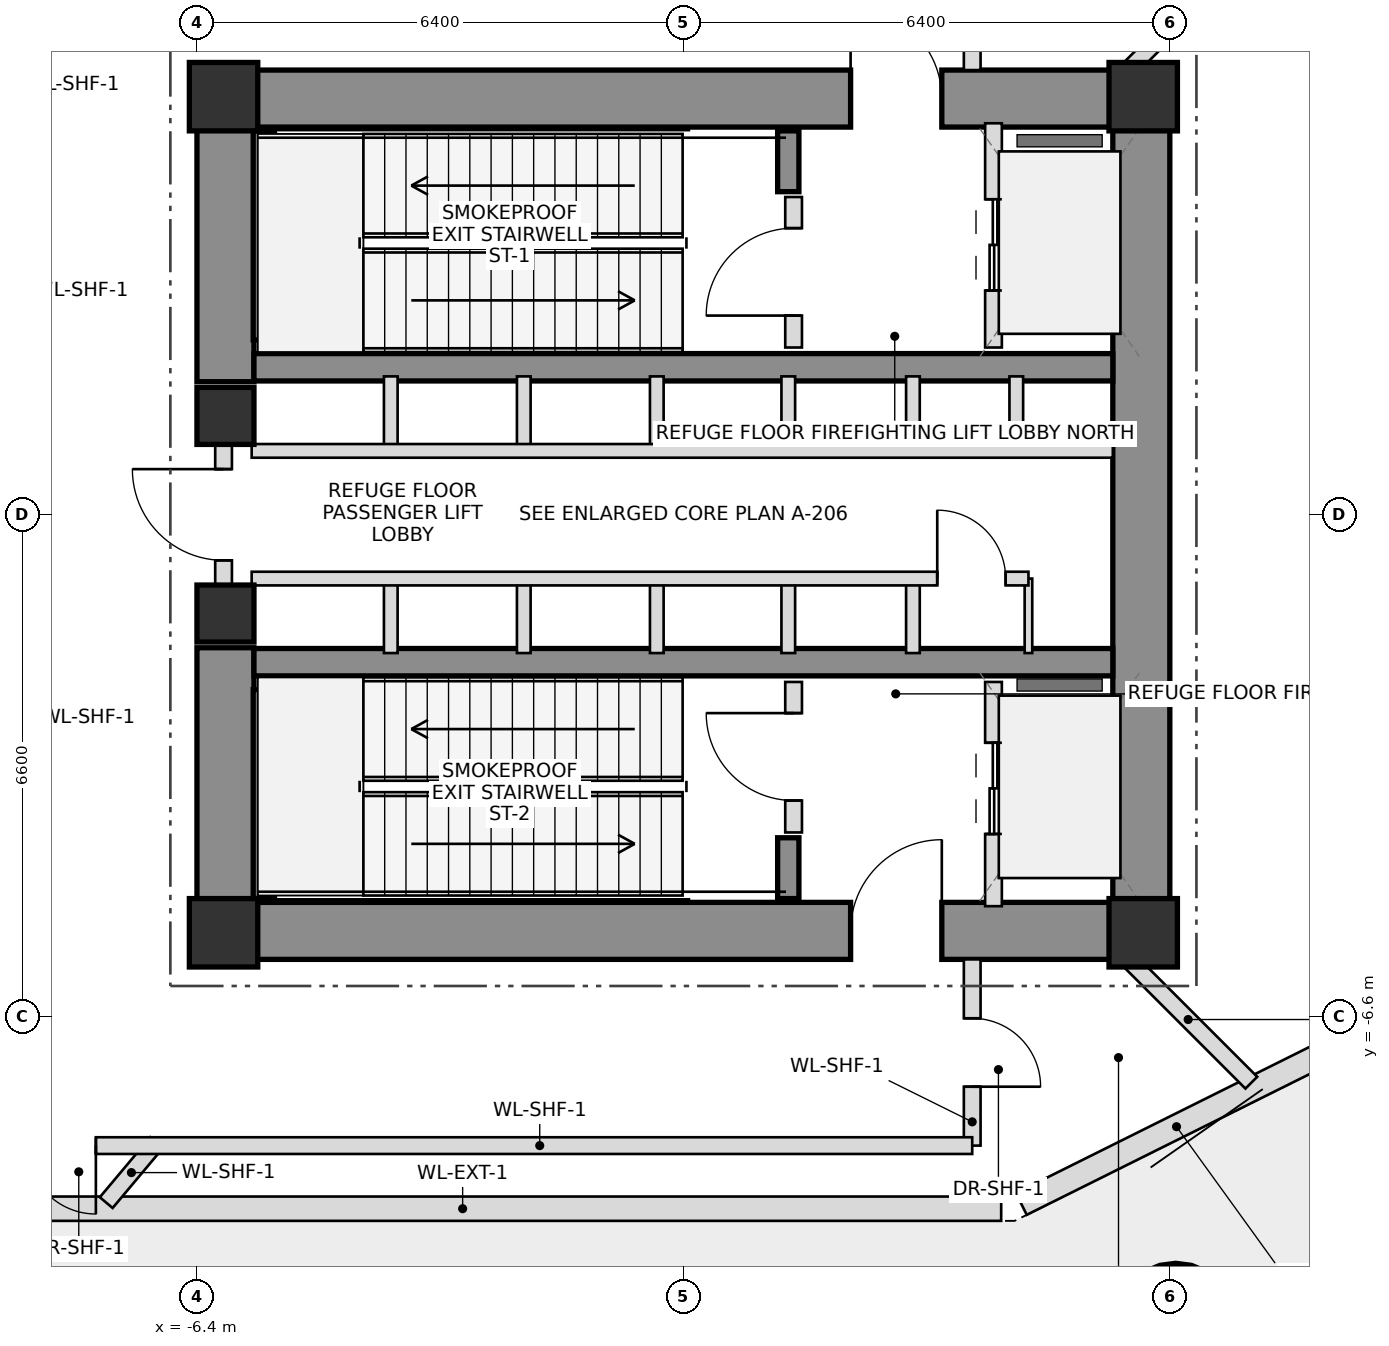
"""IFC4 building model, lengths in metres.
Left out: names, types, materials, properties, quantities, classifications, styles, units other than length and angle.
Written with IfcOpenShell. Run it as: python <this file> out.ifc"""

import sys

from ifc_helpers import new_model, si_unit, direction, frame, frame_2d, origin, origin_2d, place, context, subcontext, project, spatial, rectangle, hollow_circle, extrude, source, transform, mapped, element, fill, save


model = new_model("IFC4")
c1 = context("Model", 3, precision=1e-05, world=origin(), true_north=direction((0.0, 1.0)))
c2 = subcontext(c1, "Body", "Model", "MODEL_VIEW")
j1 = project(units=[si_unit("LENGTHUNIT", "METRE"), si_unit("PLANEANGLEUNIT", "RADIAN")], contexts=[c1])
p1 = place(None, origin())
s1 = spatial("IfcSite", under=j1, at=p1, CompositionType="ELEMENT")
p2 = place(p1, origin())
s2 = spatial("IfcBuilding", under=s1, at=p2, CompositionType="ELEMENT")
p3 = place(p2, frame((0.0, 0.0, 49.7)))
s3 = spatial("IfcBuildingStorey", under=s2, at=p3, CompositionType="ELEMENT", Elevation=49.7)
m1 = source(origin(), c2, "Body", "SweptSolid", [
    extrude(rectangle(XDim=0.9, YDim=0.9, at=origin_2d()), origin(), (0.0, 0.0, 1.0), 5.1),
])
for number, where, z_axis, x_axis in (
    (1, (-6.05, -5.5, 0.0), (0.0, 0.0, 1.0), (1.0, 0.0, 0.0)),
    (2, (6.05, -5.5, 0.0), (0.0, 0.0, 1.0), (1.0, 0.0, 0.0)),
    (3, (6.05, 5.5, 0.0), (0.0, 0.0, 1.0), (1.0, 0.0, 0.0)),
    (4, (-6.05, 5.5, 0.0), (0.0, 0.0, 1.0), (1.0, 0.0, 0.0)),
):
    element("IfcColumn", number, at=place(p3, frame(where, z_axis=z_axis, x_axis=x_axis)), inside=s3, PredefinedType="COLUMN", context=c2, shape_type="MappedRepresentation", body=[
        mapped(m1, transform((0.0, 0.0, 0.0), scale=1.0)),
    ])
p4 = place(p3, frame((-6.4, 5.475, 0.0), z_axis=(0.0, 0.0, 1.0), x_axis=(1.0, 0.0, 0.0)))
e5 = element("IfcWall", 5, at=p4, inside=s3, PredefinedType="SHEAR", context=c2, shape_type="SweptSolid", body=[
    extrude(rectangle(XDim=12.8, YDim=0.75, at=frame_2d((6.4, 0.0))), origin(), (0.0, 0.0, 1.0), 5.1),
])
p5 = place(p4, frame((8.6, 0.0, 0.0)))
e6 = element("IfcOpeningElement", 6, at=p5, cuts=e5, PredefinedType="OPENING", context=c2, shape_type="SweptSolid", body=[
    extrude(rectangle(XDim=1.2, YDim=2.2, at=frame_2d((0.6, 1.1))), frame((0.0, 0.385, 0.0), z_axis=(0.0, -1.0, 0.0), x_axis=(1.0, 0.0, 0.0)), (0.0, 0.0, 1.0), 0.77),
])
p6 = place(p3, frame((-6.4, -5.475, 0.0), z_axis=(0.0, 0.0, 1.0), x_axis=(1.0, 0.0, 0.0)))
e7 = element("IfcWall", 7, at=p6, inside=s3, PredefinedType="SHEAR", context=c2, shape_type="SweptSolid", body=[
    extrude(rectangle(XDim=12.8, YDim=0.75, at=frame_2d((6.4, 0.0))), origin(), (0.0, 0.0, 1.0), 5.1),
])
p7 = place(p6, frame((8.6, 0.0, 0.0)))
e8 = element("IfcOpeningElement", 8, at=p7, cuts=e7, PredefinedType="OPENING", context=c2, shape_type="SweptSolid", body=[
    extrude(rectangle(XDim=1.2, YDim=2.2, at=frame_2d((0.6, 1.1))), frame((0.0, 0.385, 0.0), z_axis=(0.0, -1.0, 0.0), x_axis=(1.0, 0.0, 0.0)), (0.0, 0.0, 1.0), 0.77),
])
p8 = place(p3, frame((6.025, -5.1, 0.0), z_axis=(0.0, 0.0, 1.0), x_axis=(0.0, 1.0, 0.0)))
e9 = element("IfcWall", 9, at=p8, inside=s3, PredefinedType="SHEAR", context=c2, shape_type="SweptSolid", body=[
    extrude(rectangle(XDim=10.2, YDim=0.75, at=frame_2d((5.1, 0.0))), origin(), (0.0, 0.0, 1.0), 5.1),
])
for number, where, z_axis, x_axis in (
    (10, (-6.025, -5.1, 0.0), (0.0, 0.0, 1.0), (0.0, 1.0, 0.0)),
    (11, (-6.025, 1.75, 0.0), (0.0, 0.0, 1.0), (0.0, 1.0, 0.0)),
):
    element("IfcWall", number, at=place(p3, frame(where, z_axis=z_axis, x_axis=x_axis)), inside=s3, PredefinedType="SHEAR", context=c2, shape_type="SweptSolid", body=[
        extrude(rectangle(XDim=3.35, YDim=0.75, at=frame_2d((1.675, 0.0))), origin(), (0.0, 0.0, 1.0), 5.1),
    ])
for number, where, z_axis, x_axis in (
    (12, (-5.65, 1.94, 0.0), (0.0, 0.0, 1.0), (1.0, 0.0, 0.0)),
    (13, (-5.65, -1.94, 0.0), (0.0, 0.0, 1.0), (1.0, 0.0, 0.0)),
):
    element("IfcWall", number, at=place(p3, frame(where, z_axis=z_axis, x_axis=x_axis)), inside=s3, PredefinedType="SHEAR", context=c2, shape_type="SweptSolid", body=[
        extrude(rectangle(XDim=11.3, YDim=0.36, at=frame_2d((5.65, 0.0))), origin(), (0.0, 0.0, 1.0), 5.1),
    ])
p9 = place(p3, frame((-5.52, 2.3, 0.0), z_axis=(0.0, 0.0, 1.0), x_axis=(0.0, 1.0, 0.0)))
e14 = element("IfcWall", 14, at=p9, inside=s3, PredefinedType="SHEAR", context=c2, shape_type="SweptSolid", body=[
    extrude(rectangle(XDim=2.75, YDim=0.28, at=frame_2d((1.375, 0.0))), origin(), (0.0, 0.0, 1.0), 5.1),
])
p10 = place(p3, frame((1.38, 4.25, 0.0), z_axis=(0.0, 0.0, 1.0), x_axis=(0.0, 1.0, 0.0)))
e15 = element("IfcWall", 15, at=p10, inside=s3, PredefinedType="SHEAR", context=c2, shape_type="SweptSolid", body=[
    extrude(rectangle(XDim=0.8, YDim=0.28, at=frame_2d((0.4, 0.0))), origin(), (0.0, 0.0, 1.0), 5.1),
])
p11 = place(p3, frame((-5.52, -5.05, 0.0), z_axis=(0.0, 0.0, 1.0), x_axis=(0.0, 1.0, 0.0)))
e16 = element("IfcWall", 16, at=p11, inside=s3, PredefinedType="SHEAR", context=c2, shape_type="SweptSolid", body=[
    extrude(rectangle(XDim=2.75, YDim=0.28, at=frame_2d((1.375, 0.0))), origin(), (0.0, 0.0, 1.0), 5.1),
])
p12 = place(p3, frame((1.38, -5.05, 0.0), z_axis=(0.0, 0.0, 1.0), x_axis=(0.0, 1.0, 0.0)))
e17 = element("IfcWall", 17, at=p12, inside=s3, PredefinedType="SHEAR", context=c2, shape_type="SweptSolid", body=[
    extrude(rectangle(XDim=0.8, YDim=0.28, at=frame_2d((0.4, 0.0))), origin(), (0.0, 0.0, 1.0), 5.1),
])
m2 = source(origin(), c2, "Body", "SweptSolid", [
    extrude(rectangle(XDim=0.75, YDim=0.75, at=origin_2d()), origin(), (0.0, 0.0, 1.0), 5.1),
])
for number, where, z_axis, x_axis in (
    (18, (-6.025, -1.3, 0.0), (0.0, 0.0, 1.0), (1.0, 0.0, 0.0)),
    (19, (-6.025, 1.3, 0.0), (0.0, 0.0, 1.0), (1.0, 0.0, 0.0)),
):
    element("IfcColumn", number, at=place(p3, frame(where, z_axis=z_axis, x_axis=x_axis)), inside=s3, PredefinedType="COLUMN", context=c2, shape_type="MappedRepresentation", body=[
        mapped(m2, transform((0.0, 0.0, 0.0), scale=1.0)),
    ])
m3 = source(origin(), c2, "Body", "SweptSolid", [
    extrude(hollow_circle(Radius=0.8, WallThickness=0.055, at=origin_2d()), origin(), (0.0, 0.0, 1.0), 5.0),
])
p13 = place(p3, frame((6.477, -10.648, 0.0), z_axis=(0.0, 0.0, 1.0), x_axis=(1.0, 0.0, 0.0)))
e20 = element("IfcColumn", 20, at=p13, inside=s3, PredefinedType="COLUMN", context=c2, shape_type="MappedRepresentation", body=[
    mapped(m3, transform((0.0, 0.0, 0.0), scale=1.0)),
])
p14 = place(p3, frame((-6.05, -0.95, 0.0), z_axis=(0.0, 0.0, 1.0), x_axis=(0.0, 1.0, 0.0)))
e21 = element("IfcWall", 21, at=p14, inside=s3, PredefinedType="PLUMBINGWALL", context=c2, shape_type="SweptSolid", body=[
    extrude(rectangle(XDim=1.9, YDim=0.22, at=frame_2d((0.95, 0.0))), origin(), (0.0, 0.0, 1.0), 3.875),
])
p15 = place(p14, frame((0.35, 0.0, 0.0)))
e22 = element("IfcOpeningElement", 22, at=p15, cuts=e21, PredefinedType="OPENING", context=c2, shape_type="SweptSolid", body=[
    extrude(rectangle(XDim=1.2, YDim=2.2, at=frame_2d((0.6, 1.1))), frame((0.0, 0.12, 0.0), z_axis=(0.0, -1.0, 0.0), x_axis=(1.0, 0.0, 0.0)), (0.0, 0.0, 1.0), 0.24),
])
p16 = place(p3, frame((1.45, 2.2, 0.0), z_axis=(0.0, 0.0, 1.0), x_axis=(0.0, 1.0, 0.0)))
e23 = element("IfcWall", 23, at=p16, inside=s3, PredefinedType="PLUMBINGWALL", context=c2, shape_type="SweptSolid", body=[
    extrude(rectangle(XDim=1.98, YDim=0.22, at=frame_2d((0.99, 0.0))), origin(), (0.0, 0.0, 1.0), 4.895),
])
p17 = place(p16, frame((0.42, 0.0, 0.0)))
e24 = element("IfcOpeningElement", 24, at=p17, cuts=e23, PredefinedType="OPENING", context=c2, shape_type="SweptSolid", body=[
    extrude(rectangle(XDim=1.15, YDim=2.15, at=frame_2d((0.575, 1.075))), frame((0.0, 0.12, 0.0), z_axis=(0.0, -1.0, 0.0), x_axis=(1.0, 0.0, 0.0)), (0.0, 0.0, 1.0), 0.24),
])
p18 = place(p3, frame((4.08, 2.2, 0.0), z_axis=(0.0, 0.0, 1.0), x_axis=(0.0, 1.0, 0.0)))
e25 = element("IfcWall", 25, at=p18, inside=s3, PredefinedType="PLUMBINGWALL", context=c2, shape_type="SweptSolid", body=[
    extrude(rectangle(XDim=2.95, YDim=0.22, at=frame_2d((1.475, 0.0))), origin(), (0.0, 0.0, 1.0), 4.895),
])
p19 = place(p18, frame((0.75, 0.0, 0.0)))
e26 = element("IfcOpeningElement", 26, at=p19, cuts=e25, PredefinedType="OPENING", context=c2, shape_type="SweptSolid", body=[
    extrude(rectangle(XDim=1.2, YDim=2.25, at=frame_2d((0.6, 1.125))), frame((0.0, 0.12, 0.0), z_axis=(0.0, -1.0, 0.0), x_axis=(1.0, 0.0, 0.0)), (0.0, 0.0, 1.0), 0.24),
])
p20 = place(p3, frame((1.45, -4.18, 0.0), z_axis=(0.0, 0.0, 1.0), x_axis=(0.0, 1.0, 0.0)))
e27 = element("IfcWall", 27, at=p20, inside=s3, PredefinedType="PLUMBINGWALL", context=c2, shape_type="SweptSolid", body=[
    extrude(rectangle(XDim=1.98, YDim=0.22, at=frame_2d((0.99, 0.0))), origin(), (0.0, 0.0, 1.0), 4.895),
])
p21 = place(p20, frame((0.42, 0.0, 0.0)))
e28 = element("IfcOpeningElement", 28, at=p21, cuts=e27, PredefinedType="OPENING", context=c2, shape_type="SweptSolid", body=[
    extrude(rectangle(XDim=1.15, YDim=2.15, at=frame_2d((0.575, 1.075))), frame((0.0, 0.12, 0.0), z_axis=(0.0, -1.0, 0.0), x_axis=(1.0, 0.0, 0.0)), (0.0, 0.0, 1.0), 0.24),
])
p22 = place(p3, frame((4.08, -5.15, 0.0), z_axis=(0.0, 0.0, 1.0), x_axis=(0.0, 1.0, 0.0)))
e29 = element("IfcWall", 29, at=p22, inside=s3, PredefinedType="PLUMBINGWALL", context=c2, shape_type="SweptSolid", body=[
    extrude(rectangle(XDim=2.95, YDim=0.22, at=frame_2d((1.475, 0.0))), origin(), (0.0, 0.0, 1.0), 4.895),
])
p23 = place(p22, frame((0.95, 0.0, 0.0)))
e30 = element("IfcOpeningElement", 30, at=p23, cuts=e29, PredefinedType="OPENING", context=c2, shape_type="SweptSolid", body=[
    extrude(rectangle(XDim=1.2, YDim=2.25, at=frame_2d((0.6, 1.125))), frame((0.0, 0.12, 0.0), z_axis=(0.0, -1.0, 0.0), x_axis=(1.0, 0.0, 0.0)), (0.0, 0.0, 1.0), 0.24),
])
for number, where, z_axis, x_axis in (
    (31, (-3.85, 0.84, 0.0), (0.0, 0.0, 1.0), (0.0, 1.0, 0.0)),
    (32, (-3.85, -1.82, 0.0), (0.0, 0.0, 1.0), (0.0, 1.0, 0.0)),
    (33, (-2.1, 0.84, 0.0), (0.0, 0.0, 1.0), (0.0, 1.0, 0.0)),
    (34, (-2.1, -1.82, 0.0), (0.0, 0.0, 1.0), (0.0, 1.0, 0.0)),
    (35, (-0.35, 0.84, 0.0), (0.0, 0.0, 1.0), (0.0, 1.0, 0.0)),
    (36, (-0.35, -1.82, 0.0), (0.0, 0.0, 1.0), (0.0, 1.0, 0.0)),
    (37, (1.38, 0.84, 0.0), (0.0, 0.0, 1.0), (0.0, 1.0, 0.0)),
    (38, (1.38, -1.82, 0.0), (0.0, 0.0, 1.0), (0.0, 1.0, 0.0)),
    (39, (3.02, 0.84, 0.0), (0.0, 0.0, 1.0), (0.0, 1.0, 0.0)),
    (40, (4.38, 0.84, 0.0), (0.0, 0.0, 1.0), (0.0, 1.0, 0.0)),
    (41, (3.02, -1.82, 0.0), (0.0, 0.0, 1.0), (0.0, 1.0, 0.0)),
):
    element("IfcWall", number, at=place(p3, frame(where, z_axis=z_axis, x_axis=x_axis)), inside=s3, PredefinedType="PLUMBINGWALL", context=c2, shape_type="SweptSolid", body=[
        extrude(rectangle(XDim=0.98, YDim=0.18, at=frame_2d((0.49, 0.0))), origin(), (0.0, 0.0, 1.0), 4.895),
    ])
p24 = place(p3, frame((4.54, -1.82, 0.0), z_axis=(0.0, 0.0, 1.0), x_axis=(0.0, 1.0, 0.0)))
e42 = element("IfcWall", 42, at=p24, inside=s3, PredefinedType="PARTITIONING", context=c2, shape_type="SweptSolid", body=[
    extrude(rectangle(XDim=0.98, YDim=0.1, at=frame_2d((0.49, 0.0))), origin(), (0.0, 0.0, 1.0), 4.895),
])
p25 = place(p3, frame((-5.68, 0.84, 0.0), z_axis=(0.0, 0.0, 1.0), x_axis=(1.0, 0.0, 0.0)))
e43 = element("IfcWall", 43, at=p25, inside=s3, PredefinedType="PLUMBINGWALL", context=c2, shape_type="SweptSolid", body=[
    extrude(rectangle(XDim=11.33, YDim=0.18, at=frame_2d((5.665, 0.0))), origin(), (0.0, 0.0, 1.0), 4.895),
])
p26 = place(p3, frame((-5.68, -0.84, 0.0), z_axis=(0.0, 0.0, 1.0), x_axis=(1.0, 0.0, 0.0)))
e44 = element("IfcWall", 44, at=p26, inside=s3, PredefinedType="PLUMBINGWALL", context=c2, shape_type="SweptSolid", body=[
    extrude(rectangle(XDim=10.22, YDim=0.18, at=frame_2d((5.11, 0.0))), origin(), (0.0, 0.0, 1.0), 4.895),
])
p27 = place(p26, frame((9.02, 0.0, 0.0)))
e45 = element("IfcOpeningElement", 45, at=p27, cuts=e44, PredefinedType="OPENING", context=c2, shape_type="SweptSolid", body=[
    extrude(rectangle(XDim=0.9, YDim=2.05, at=frame_2d((0.45, 1.025))), frame((0.0, 0.1, 0.0), z_axis=(0.0, -1.0, 0.0), x_axis=(1.0, 0.0, 0.0)), (0.0, 0.0, 1.0), 0.2),
])
p28 = place(p3, frame((8.53, -7.035, 0.0), z_axis=(0.0, 0.0, 1.0), x_axis=(-0.89523927292, -0.445585731619, 0.0)))
e46 = element("IfcWall", 46, at=p28, inside=s3, PredefinedType="SOLIDWALL", context=c2, shape_type="SweptSolid", body=[
    extrude(rectangle(XDim=4.561, YDim=0.32, at=frame_2d((2.281, 0.0))), origin(), (0.0, 0.0, 1.0), 3.55),
])
p29 = place(p3, frame((4.181, -9.13, 0.0), z_axis=(0.0, 0.0, 1.0), x_axis=(-1.0, 0.0, 0.0)))
e47 = element("IfcWall", 47, at=p29, inside=s3, PredefinedType="SOLIDWALL", context=c2, shape_type="SweptSolid", body=[
    extrude(rectangle(XDim=14.171, YDim=0.32, at=frame_2d((7.085, 0.0))), origin(), (0.0, 0.0, 1.0), 4.895),
])
p30 = place(p3, frame((5.81, 5.81, 0.0), z_axis=(0.0, 0.0, 1.0), x_axis=(0.707106781187, 0.707106781187, 0.0)))
e48 = element("IfcWall", 48, at=p30, inside=s3, PredefinedType="PLUMBINGWALL", context=c2, shape_type="SweptSolid", body=[
    extrude(rectangle(XDim=2.351, YDim=0.22, at=frame_2d((1.175, 0.0))), origin(), (0.0, 0.0, 1.0), 3.55),
])
p31 = place(p3, frame((-6.931, -8.26, 0.0), z_axis=(0.0, 0.0, 1.0), x_axis=(-0.642881168458, -0.765965928251, 0.0)))
e49 = element("IfcWall", 49, at=p31, inside=s3, PredefinedType="PLUMBINGWALL", context=c2, shape_type="SweptSolid", body=[
    extrude(rectangle(XDim=1.031, YDim=0.22, at=frame_2d((0.516, 0.0))), origin(), (0.0, 0.0, 1.0), 4.895),
])
p32 = place(p3, frame((5.81, -5.81, 0.0), z_axis=(0.0, 0.0, 1.0), x_axis=(0.707106781187, -0.707106781187, 0.0)))
e50 = element("IfcWall", 50, at=p32, inside=s3, PredefinedType="PLUMBINGWALL", context=c2, shape_type="SweptSolid", body=[
    extrude(rectangle(XDim=2.351, YDim=0.22, at=frame_2d((1.175, 0.0))), origin(), (0.0, 0.0, 1.0), 3.55),
])
p33 = place(p3, frame((3.8, -5.85, 0.0), z_axis=(0.0, 0.0, 1.0), x_axis=(0.0, -1.0, 0.0)))
e51 = element("IfcWall", 51, at=p33, inside=s3, PredefinedType="PLUMBINGWALL", context=c2, shape_type="SweptSolid", body=[
    extrude(rectangle(XDim=2.45, YDim=0.22, at=frame_2d((1.225, 0.0))), origin(), (0.0, 0.0, 1.0), 4.895),
])
p34 = place(p33, frame((0.775, 0.0, 0.0)))
e52 = element("IfcOpeningElement", 52, at=p34, cuts=e51, PredefinedType="OPENING", context=c2, shape_type="SweptSolid", body=[
    extrude(rectangle(XDim=0.9, YDim=2.05, at=frame_2d((0.45, 1.025))), frame((0.0, 0.12, 0.0), z_axis=(0.0, -1.0, 0.0), x_axis=(1.0, 0.0, 0.0)), (0.0, 0.0, 1.0), 0.24),
])
p35 = place(p3, frame((3.8, -8.3, 0.0), z_axis=(0.0, 0.0, 1.0), x_axis=(-1.0, 0.0, 0.0)))
e53 = element("IfcWall", 53, at=p35, inside=s3, PredefinedType="PLUMBINGWALL", context=c2, shape_type="SweptSolid", body=[
    extrude(rectangle(XDim=12.65, YDim=0.22, at=frame_2d((6.325, 0.0))), origin(), (0.0, 0.0, 1.0), 4.895),
])
p36 = place(p35, frame((11.53, 0.0, 0.0)))
e54 = element("IfcOpeningElement", 54, at=p36, cuts=e53, PredefinedType="OPENING", context=c2, shape_type="SweptSolid", body=[
    extrude(rectangle(XDim=0.9, YDim=2.05, at=frame_2d((0.45, 1.025))), frame((0.0, 0.12, 0.0), z_axis=(0.0, -1.0, 0.0), x_axis=(1.0, 0.0, 0.0)), (0.0, 0.0, 1.0), 0.24),
])
p37 = place(p3, frame((3.8, 8.3, 0.0), z_axis=(0.0, 0.0, 1.0), x_axis=(0.0, -1.0, 0.0)))
e55 = element("IfcWall", 55, at=p37, inside=s3, PredefinedType="PLUMBINGWALL", context=c2, shape_type="SweptSolid", body=[
    extrude(rectangle(XDim=2.45, YDim=0.22, at=frame_2d((1.225, 0.0))), origin(), (0.0, 0.0, 1.0), 4.895),
])
p38 = place(p5, origin())
e56 = element("IfcDoor", 56, at=p38, inside=s3, OperationType="SINGLE_SWING_LEFT", PredefinedType="DOOR", context=c2, shape_type="SweptSolid", body=[
    extrude(rectangle(XDim=1.2, YDim=2.2, at=frame_2d((0.6, 1.1))), frame((0.0, 0.025, 0.0), z_axis=(0.0, -1.0, 0.0), x_axis=(1.0, 0.0, 0.0)), (0.0, 0.0, 1.0), 0.05),
])
fill(e6, e56)
p39 = place(p7, origin())
e57 = element("IfcDoor", 57, at=p39, inside=s3, OperationType="SINGLE_SWING_RIGHT", PredefinedType="DOOR", context=c2, shape_type="SweptSolid", body=[
    extrude(rectangle(XDim=1.2, YDim=2.2, at=frame_2d((0.6, 1.1))), frame((0.0, 0.025, 0.0), z_axis=(0.0, -1.0, 0.0), x_axis=(1.0, 0.0, 0.0)), (0.0, 0.0, 1.0), 0.05),
])
fill(e8, e57)
p40 = place(p15, origin())
e58 = element("IfcDoor", 58, at=p40, inside=s3, OperationType="SINGLE_SWING_RIGHT", PredefinedType="DOOR", context=c2, shape_type="SweptSolid", body=[
    extrude(rectangle(XDim=1.2, YDim=2.2, at=frame_2d((0.6, 1.1))), frame((0.0, 0.025, 0.0), z_axis=(0.0, -1.0, 0.0), x_axis=(1.0, 0.0, 0.0)), (0.0, 0.0, 1.0), 0.05),
])
fill(e22, e58)
p41 = place(p17, origin())
e59 = element("IfcDoor", 59, at=p41, inside=s3, OperationType="SINGLE_SWING_LEFT", PredefinedType="DOOR", context=c2, shape_type="SweptSolid", body=[
    extrude(rectangle(XDim=1.15, YDim=2.15, at=frame_2d((0.575, 1.075))), frame((0.0, 0.025, 0.0), z_axis=(0.0, -1.0, 0.0), x_axis=(1.0, 0.0, 0.0)), (0.0, 0.0, 1.0), 0.05),
])
fill(e24, e59)
p42 = place(p19, origin())
e60 = element("IfcDoor", 60, at=p42, inside=s3, OperationType="DOUBLE_DOOR_SLIDING", PredefinedType="DOOR", context=c2, shape_type="SweptSolid", body=[
    extrude(rectangle(XDim=1.2, YDim=2.25, at=frame_2d((0.6, 1.125))), frame((0.0, 0.025, 0.0), z_axis=(0.0, -1.0, 0.0), x_axis=(1.0, 0.0, 0.0)), (0.0, 0.0, 1.0), 0.05),
])
fill(e26, e60)
p43 = place(p21, origin())
e61 = element("IfcDoor", 61, at=p43, inside=s3, OperationType="SINGLE_SWING_RIGHT", PredefinedType="DOOR", context=c2, shape_type="SweptSolid", body=[
    extrude(rectangle(XDim=1.15, YDim=2.15, at=frame_2d((0.575, 1.075))), frame((0.0, 0.025, 0.0), z_axis=(0.0, -1.0, 0.0), x_axis=(1.0, 0.0, 0.0)), (0.0, 0.0, 1.0), 0.05),
])
fill(e28, e61)
p44 = place(p23, origin())
e62 = element("IfcDoor", 62, at=p44, inside=s3, OperationType="DOUBLE_DOOR_SLIDING", PredefinedType="DOOR", context=c2, shape_type="SweptSolid", body=[
    extrude(rectangle(XDim=1.2, YDim=2.25, at=frame_2d((0.6, 1.125))), frame((0.0, 0.025, 0.0), z_axis=(0.0, -1.0, 0.0), x_axis=(1.0, 0.0, 0.0)), (0.0, 0.0, 1.0), 0.05),
])
fill(e30, e62)
p45 = place(p27, origin())
e63 = element("IfcDoor", 63, at=p45, inside=s3, OperationType="SINGLE_SWING_LEFT", PredefinedType="DOOR", context=c2, shape_type="SweptSolid", body=[
    extrude(rectangle(XDim=0.9, YDim=2.05, at=frame_2d((0.45, 1.025))), frame((0.0, 0.025, 0.0), z_axis=(0.0, -1.0, 0.0), x_axis=(1.0, 0.0, 0.0)), (0.0, 0.0, 1.0), 0.05),
])
fill(e45, e63)
p46 = place(p34, origin())
e64 = element("IfcDoor", 64, at=p46, inside=s3, OperationType="SINGLE_SWING_RIGHT", PredefinedType="DOOR", context=c2, shape_type="SweptSolid", body=[
    extrude(rectangle(XDim=0.9, YDim=2.05, at=frame_2d((0.45, 1.025))), frame((0.0, 0.025, 0.0), z_axis=(0.0, -1.0, 0.0), x_axis=(1.0, 0.0, 0.0)), (0.0, 0.0, 1.0), 0.05),
])
fill(e52, e64)
p47 = place(p36, origin())
e65 = element("IfcDoor", 65, at=p47, inside=s3, OperationType="SINGLE_SWING_LEFT", PredefinedType="DOOR", context=c2, shape_type="SweptSolid", body=[
    extrude(rectangle(XDim=0.9, YDim=2.05, at=frame_2d((0.45, 1.025))), frame((0.0, 0.025, 0.0), z_axis=(0.0, -1.0, 0.0), x_axis=(1.0, 0.0, 0.0)), (0.0, 0.0, 1.0), 0.05),
])
fill(e54, e65)
save(model, sys.argv[1])
